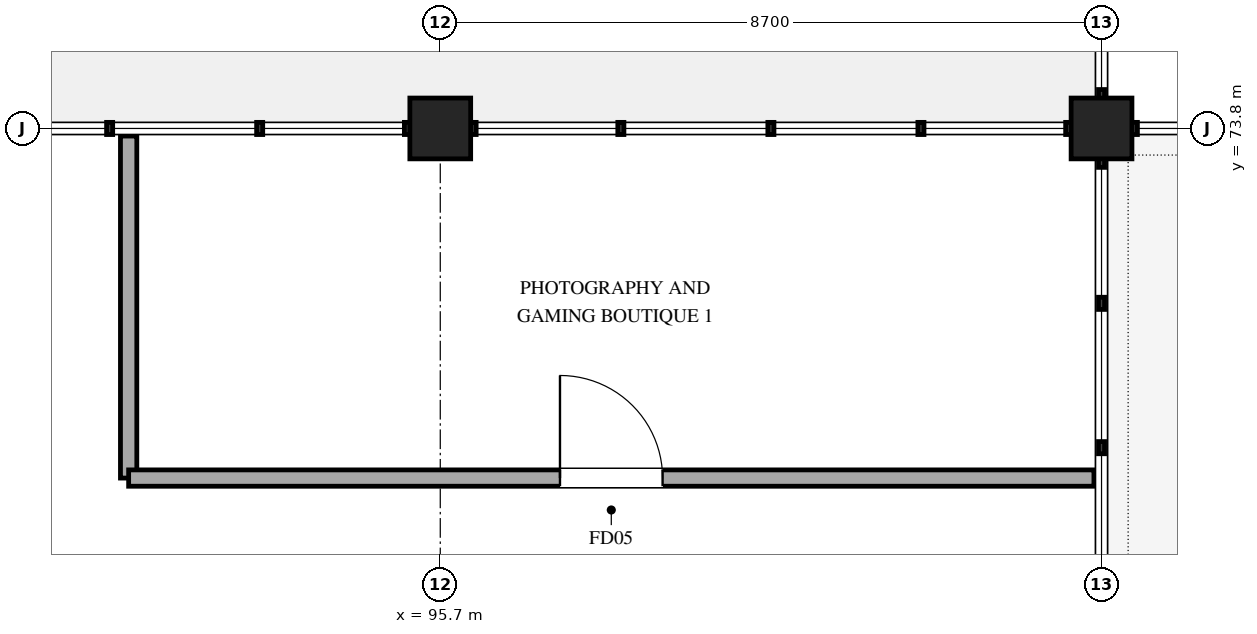
"""IFC4 building model, lengths in metres.
Left out: names, types, materials, properties, quantities, classifications, styles, units other than length and angle.
Written with IfcOpenShell. Run it as: python <this file> out.ifc"""

import sys

from ifc_helpers import new_model, si_unit, direction, frame, frame_2d, origin, origin_2d, place, context, subcontext, project, spatial, rectangle, extrude, element, fill, save


model = new_model("IFC4")
c1 = context("Model", 3, precision=1e-05, world=origin(), true_north=direction((0.0, 1.0)))
c2 = subcontext(c1, "Body", "Model", "MODEL_VIEW")
j1 = project(units=[si_unit("LENGTHUNIT", "METRE"), si_unit("PLANEANGLEUNIT", "RADIAN")], contexts=[c1])
p1 = place(None, origin())
s1 = spatial("IfcSite", under=j1, at=p1, CompositionType="ELEMENT")
p2 = place(p1, origin())
s2 = spatial("IfcBuilding", under=s1, at=p2, CompositionType="ELEMENT")
p3 = place(p2, frame((0.0, 0.0, 16.5)))
s3 = spatial("IfcBuildingStorey", under=s2, at=p3, CompositionType="ELEMENT", Elevation=16.5)
for number, where, z_axis, x_axis in (
    (1, (95.7, 73.8, 0.0), (0.0, 0.0, 1.0), (1.0, 0.0, 0.0)),
    (2, (104.4, 73.8, 0.0), (0.0, 0.0, 1.0), (1.0, 0.0, 0.0)),
):
    element("IfcColumn", number, at=place(p3, frame(where, z_axis=z_axis, x_axis=x_axis)), inside=s3, PredefinedType="COLUMN", context=c2, shape_type="SweptSolid", body=[
        extrude(rectangle(XDim=0.8, YDim=0.8, at=origin_2d()), origin(), (0.0, 0.0, 1.0), 5.1),
    ])
p4 = place(p3, frame((91.6, 73.7, 0.0), z_axis=(0.0, 0.0, 1.0), x_axis=(0.0, -1.0, 0.0)))
e3 = element("IfcWall", 3, at=p4, inside=s3, PredefinedType="PARTITIONING", context=c2, shape_type="SweptSolid", body=[
    extrude(rectangle(XDim=4.5, YDim=0.215, at=frame_2d((2.25, 0.0))), origin(), (0.0, 0.0, 1.0), 4.26),
])
p5 = place(p3, frame((91.6, 69.2, 0.0), z_axis=(0.0, 0.0, 1.0), x_axis=(1.0, 0.0, 0.0)))
e4 = element("IfcWall", 4, at=p5, inside=s3, PredefinedType="PARTITIONING", context=c2, shape_type="SweptSolid", body=[
    extrude(rectangle(XDim=12.7, YDim=0.215, at=frame_2d((6.35, 0.0))), origin(), (0.0, 0.0, 1.0), 4.06),
])
p6 = place(p5, frame((5.675, 0.0, 0.0)))
e5 = element("IfcOpeningElement", 5, at=p6, cuts=e4, PredefinedType="OPENING", context=c2, shape_type="SweptSolid", body=[
    extrude(rectangle(XDim=1.35, YDim=2.2, at=frame_2d((0.675, 1.1))), frame((0.0, 0.118, 0.0), z_axis=(0.0, -1.0, 0.0), x_axis=(1.0, 0.0, 0.0)), (0.0, 0.0, 1.0), 0.235),
])
p7 = place(p6, origin())
e6 = element("IfcDoor", 6, at=p7, inside=s3, OperationType="SINGLE_SWING_LEFT", PredefinedType="DOOR", context=c2, shape_type="SweptSolid", body=[
    extrude(rectangle(XDim=1.35, YDim=2.2, at=frame_2d((0.675, 1.1))), frame((0.0, 0.025, 0.0), z_axis=(0.0, -1.0, 0.0), x_axis=(1.0, 0.0, 0.0)), (0.0, 0.0, 1.0), 0.05),
])
fill(e5, e6)
save(model, sys.argv[1])
